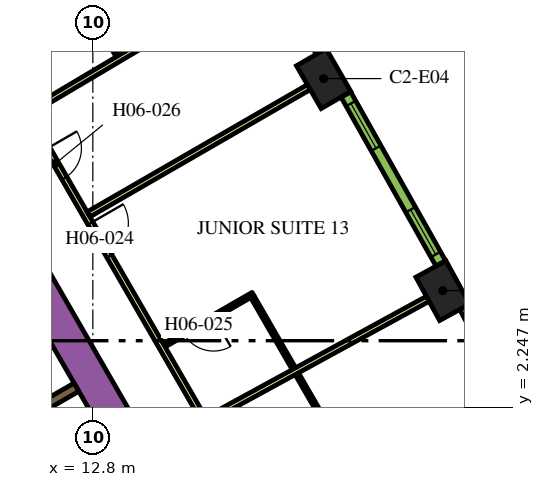
"""IFC4 building model, lengths in metres.
Left out: names, types, materials, properties, quantities, classifications, styles, units other than length and angle.
Written with IfcOpenShell. Run it as: python <this file> out.ifc"""

import sys

from ifc_helpers import new_model, si_unit, direction, frame, frame_2d, origin, origin_2d, place, context, subcontext, project, spatial, rectangle, extrude, element, fill, save


model = new_model("IFC4")
c1 = context("Model", 3, precision=1e-05, world=origin(), true_north=direction((0.0, 1.0)))
c2 = subcontext(c1, "Body", "Model", "MODEL_VIEW")
j1 = project(units=[si_unit("LENGTHUNIT", "METRE"), si_unit("PLANEANGLEUNIT", "RADIAN")], contexts=[c1])
p1 = place(None, origin())
s1 = spatial("IfcSite", under=j1, at=p1, CompositionType="ELEMENT")
p2 = place(p1, origin())
s2 = spatial("IfcBuilding", under=s1, at=p2, CompositionType="ELEMENT")
p3 = place(p2, frame((0.0, 0.0, 87.6)))
s3 = spatial("IfcBuildingStorey", under=s2, at=p3, CompositionType="ELEMENT", Elevation=87.6)
for number, where, z_axis, x_axis in (
    (1, (22.009, 5.317, 0.0), (0.0, 0.0, 1.0), (-0.48, 0.877, 0.0)),
    (2, (18.874, 10.897, 0.0), (0.0, 0.0, 1.0), (-0.5, 0.866, 0.0)),
):
    element("IfcColumn", number, at=place(p3, frame(where, z_axis=z_axis, x_axis=x_axis)), inside=s3, PredefinedType="COLUMN", context=c2, shape_type="SweptSolid", body=[
        extrude(rectangle(XDim=1.3, YDim=0.9, at=origin_2d()), origin(), (0.0, 0.0, 1.0), 3.9),
    ])
p4 = place(p3, frame((6.776, 13.364, 0.0), z_axis=(0.0, 0.0, 1.0), x_axis=(0.500004177138, -0.8660229921, 0.0)))
e3 = element("IfcWall", 3, at=p4, inside=s3, PredefinedType="SOLIDWALL", context=c2, shape_type="SweptSolid", body=[
    extrude(rectangle(XDim=20.204, YDim=0.9, at=frame_2d((10.102, 0.0))), origin(), (0.0, 0.0, 1.0), 3.9),
])
p5 = place(p3, frame((10.464, 1.677, 0.0), z_axis=(0.0, 0.0, 1.0), x_axis=(0.86605622881, 0.499946605688, 0.0)))
e4 = element("IfcWall", 4, at=p5, inside=s3, PredefinedType="SOLIDWALL", context=c2, shape_type="SweptSolid", body=[
    extrude(rectangle(XDim=2.2, YDim=0.25, at=frame_2d((1.1, 0.0))), origin(), (0.0, 0.0, 1.0), 3.9),
])
p6 = place(p3, frame((6.163, 18.475, 0.0), z_axis=(0.0, 0.0, 1.0), x_axis=(0.500001317485, -0.866024643133, 0.0)))
e5 = element("IfcWall", 5, at=p6, inside=s3, PredefinedType="PARTITIONING", context=c2, shape_type="SweptSolid", body=[
    extrude(rectangle(XDim=25.767, YDim=0.15, at=frame_2d((12.883, 0.0))), origin(), (0.0, 0.0, 1.0), 2.75),
])
p7 = place(p6, frame((24.241, 0.0, 0.0)))
e6 = element("IfcOpeningElement", 6, at=p7, cuts=e5, PredefinedType="OPENING", context=c2, shape_type="SweptSolid", body=[
    extrude(rectangle(XDim=1.0, YDim=2.1, at=frame_2d((0.5, 1.05))), frame((0.0, 0.085, 0.0), z_axis=(0.0, -1.0, 0.0), x_axis=(1.0, 0.0, 0.0)), (0.0, 0.0, 1.0), 0.17),
])
p8 = place(p6, frame((13.144, 0.0, 0.0)))
e7 = element("IfcOpeningElement", 7, at=p8, cuts=e5, PredefinedType="OPENING", context=c2, shape_type="SweptSolid", body=[
    extrude(rectangle(XDim=1.0, YDim=2.1, at=frame_2d((0.5, 1.05))), frame((0.0, 0.085, 0.0), z_axis=(0.0, -1.0, 0.0), x_axis=(1.0, 0.0, 0.0)), (0.0, 0.0, 1.0), 0.17),
])
p9 = place(p6, frame((10.874, 0.0, 0.0)))
e8 = element("IfcOpeningElement", 8, at=p9, cuts=e5, PredefinedType="OPENING", context=c2, shape_type="SweptSolid", body=[
    extrude(rectangle(XDim=0.9, YDim=2.1, at=frame_2d((0.45, 1.05))), frame((0.0, 0.085, 0.0), z_axis=(0.0, -1.0, 0.0), x_axis=(1.0, 0.0, 0.0)), (0.0, 0.0, 1.0), 0.17),
])
p10 = place(p6, frame((3.718, 0.0, 0.0)))
e9 = element("IfcOpeningElement", 9, at=p10, cuts=e5, PredefinedType="OPENING", context=c2, shape_type="SweptSolid", body=[
    extrude(rectangle(XDim=1.1, YDim=2.1, at=frame_2d((0.55, 1.05))), frame((0.0, 0.085, 0.0), z_axis=(0.0, -1.0, 0.0), x_axis=(1.0, 0.0, 0.0)), (0.0, 0.0, 1.0), 0.17),
])
p11 = place(p6, frame((2.411, 0.0, 0.0)))
e10 = element("IfcOpeningElement", 10, at=p11, cuts=e5, PredefinedType="OPENING", context=c2, shape_type="SweptSolid", body=[
    extrude(rectangle(XDim=1.0, YDim=2.1, at=frame_2d((0.5, 1.05))), frame((0.0, 0.085, 0.0), z_axis=(0.0, -1.0, 0.0), x_axis=(1.0, 0.0, 0.0)), (0.0, 0.0, 1.0), 0.17),
])
p12 = place(p3, frame((17.379, 13.731, 0.0), z_axis=(0.0, 0.0, 1.0), x_axis=(-0.860132461691, -0.510070728768, 0.0)))
e11 = element("IfcWall", 11, at=p12, inside=s3, PredefinedType="PARTITIONING", context=c2, shape_type="SweptSolid", body=[
    extrude(rectangle(XDim=7.257, YDim=0.15, at=frame_2d((3.628, 0.0))), origin(), (0.0, 0.0, 1.0), 2.75),
])
p13 = place(p3, frame((18.484, 10.672, 0.0), z_axis=(0.0, 0.0, 1.0), x_axis=(-0.866019162053, -0.50001081084, 0.0)))
e12 = element("IfcWall", 12, at=p13, inside=s3, PredefinedType="PARTITIONING", context=c2, shape_type="SweptSolid", body=[
    extrude(rectangle(XDim=6.694, YDim=0.15, at=frame_2d((3.347, 0.0))), origin(), (0.0, 0.0, 1.0), 2.75),
])
p14 = place(p3, frame((21.614, 5.102, 0.0), z_axis=(0.0, 0.0, 1.0), x_axis=(-0.877484555087, -0.479604895287, 0.0)))
e13 = element("IfcWall", 13, at=p14, inside=s3, PredefinedType="PARTITIONING", context=c2, shape_type="SweptSolid", body=[
    extrude(rectangle(XDim=6.611, YDim=0.15, at=frame_2d((3.306, 0.0))), origin(), (0.0, 0.0, 1.0), 2.75),
])
p15 = place(p3, frame((19.196, 1.351, 0.0), z_axis=(0.0, 0.0, 1.0), x_axis=(-0.499956128963, 0.866050731258, 0.0)))
e14 = element("IfcWall", 14, at=p15, inside=s3, PredefinedType="PARTITIONING", context=c2, shape_type="SweptSolid", body=[
    extrude(rectangle(XDim=2.05, YDim=0.1, at=frame_2d((1.025, 0.0))), origin(), (0.0, 0.0, 1.0), 2.75),
])
p16 = place(p3, frame((17.016, 5.228, 0.0), z_axis=(0.0, 0.0, 1.0), x_axis=(-0.86599734893, -0.500048589285, 0.0)))
e15 = element("IfcWall", 15, at=p16, inside=s3, PredefinedType="PARTITIONING", context=c2, shape_type="SweptSolid", body=[
    extrude(rectangle(XDim=2.7, YDim=0.1, at=frame_2d((1.35, 0.0))), origin(), (0.0, 0.0, 1.0), 2.75),
])
p17 = place(p16, frame((1.2, 0.0, 0.0)))
e16 = element("IfcOpeningElement", 16, at=p17, cuts=e15, PredefinedType="OPENING", context=c2, shape_type="SweptSolid", body=[
    extrude(rectangle(XDim=0.9, YDim=2.1, at=frame_2d((0.45, 1.05))), frame((0.0, 0.06, 0.0), z_axis=(0.0, -1.0, 0.0), x_axis=(1.0, 0.0, 0.0)), (0.0, 0.0, 1.0), 0.12),
])
p18 = place(p3, frame((16.997, 5.16, 0.0), z_axis=(0.0, 0.0, 1.0), x_axis=(0.500011965869, -0.866018495177, 0.0)))
e17 = element("IfcWall", 17, at=p18, inside=s3, PredefinedType="PARTITIONING", context=c2, shape_type="SweptSolid", body=[
    extrude(rectangle(XDim=2.19, YDim=0.1, at=frame_2d((1.095, 0.0))), origin(), (0.0, 0.0, 1.0), 2.75),
])
p19 = place(p3, frame((12.259, 13.567, 0.0), z_axis=(0.0, 0.0, 1.0), x_axis=(0.500017192868, -0.86601547725, 0.0)))
e18 = element("IfcWall", 18, at=p19, inside=s3, PredefinedType="PARTITIONING", context=c2, shape_type="SweptSolid", body=[
    extrude(rectangle(XDim=2.39, YDim=0.1, at=frame_2d((1.195, 0.0))), origin(), (0.0, 0.0, 1.0), 2.75),
])
p20 = place(p3, frame((24.977, 0.383, 0.0), z_axis=(0.0, 0.0, 1.0), x_axis=(-0.469323203119, 0.883026461106, 0.0)))
e19 = element("IfcWall", 19, at=p20, inside=s3, PredefinedType="SOLIDWALL", context=c2, shape_type="SweptSolid", body=[
    extrude(rectangle(XDim=5.101, YDim=0.29, at=frame_2d((2.55, 0.0))), origin(), (0.0, 0.0, 1.0), 3.65),
])
p21 = place(p20, frame((0.273, 0.0, 0.9)))
e20 = element("IfcOpeningElement", 20, at=p21, cuts=e19, PredefinedType="OPENING", context=c2, shape_type="SweptSolid", body=[
    extrude(rectangle(XDim=1.35, YDim=2.15, at=frame_2d((0.675, 1.075))), frame((0.0, 0.155, 0.0), z_axis=(0.0, -1.0, 0.0), x_axis=(1.0, 0.0, 0.0)), (0.0, 0.0, 1.0), 0.31),
])
p22 = place(p20, frame((3.478, 0.0, 0.9)))
e21 = element("IfcOpeningElement", 21, at=p22, cuts=e19, PredefinedType="OPENING", context=c2, shape_type="SweptSolid", body=[
    extrude(rectangle(XDim=1.35, YDim=2.15, at=frame_2d((0.675, 1.075))), frame((0.0, 0.155, 0.0), z_axis=(0.0, -1.0, 0.0), x_axis=(1.0, 0.0, 0.0)), (0.0, 0.0, 1.0), 0.31),
])
p23 = place(p3, frame((21.956, 6.033, 0.0), z_axis=(0.0, 0.0, 1.0), x_axis=(-0.48983164787, 0.87181704316, 0.0)))
e22 = element("IfcWall", 22, at=p23, inside=s3, PredefinedType="SOLIDWALL", context=c2, shape_type="SweptSolid", body=[
    extrude(rectangle(XDim=5.1, YDim=0.29, at=frame_2d((2.55, 0.0))), origin(), (0.0, 0.0, 1.0), 3.65),
])
p24 = place(p23, frame((0.273, 0.0, 0.9)))
e23 = element("IfcOpeningElement", 23, at=p24, cuts=e22, PredefinedType="OPENING", context=c2, shape_type="SweptSolid", body=[
    extrude(rectangle(XDim=1.35, YDim=2.15, at=frame_2d((0.675, 1.075))), frame((0.0, 0.155, 0.0), z_axis=(0.0, -1.0, 0.0), x_axis=(1.0, 0.0, 0.0)), (0.0, 0.0, 1.0), 0.31),
])
p25 = place(p23, frame((3.478, 0.0, 0.9)))
e24 = element("IfcOpeningElement", 24, at=p25, cuts=e22, PredefinedType="OPENING", context=c2, shape_type="SweptSolid", body=[
    extrude(rectangle(XDim=1.35, YDim=2.15, at=frame_2d((0.675, 1.075))), frame((0.0, 0.155, 0.0), z_axis=(0.0, -1.0, 0.0), x_axis=(1.0, 0.0, 0.0)), (0.0, 0.0, 1.0), 0.31),
])
p26 = place(p3, frame((18.805, 11.611, 0.0), z_axis=(0.0, 0.0, 1.0), x_axis=(-0.510054281659, 0.860142214847, 0.0)))
e25 = element("IfcWall", 25, at=p26, inside=s3, PredefinedType="SOLIDWALL", context=c2, shape_type="SweptSolid", body=[
    extrude(rectangle(XDim=5.101, YDim=0.29, at=frame_2d((2.55, 0.0))), origin(), (0.0, 0.0, 1.0), 3.65),
])
p27 = place(p26, frame((0.273, 0.0, 0.9)))
e26 = element("IfcOpeningElement", 26, at=p27, cuts=e25, PredefinedType="OPENING", context=c2, shape_type="SweptSolid", body=[
    extrude(rectangle(XDim=1.35, YDim=2.15, at=frame_2d((0.675, 1.075))), frame((0.0, 0.155, 0.0), z_axis=(0.0, -1.0, 0.0), x_axis=(1.0, 0.0, 0.0)), (0.0, 0.0, 1.0), 0.31),
])
p28 = place(p26, frame((3.478, 0.0, 0.9)))
e27 = element("IfcOpeningElement", 27, at=p28, cuts=e25, PredefinedType="OPENING", context=c2, shape_type="SweptSolid", body=[
    extrude(rectangle(XDim=1.35, YDim=2.15, at=frame_2d((0.675, 1.075))), frame((0.0, 0.155, 0.0), z_axis=(0.0, -1.0, 0.0), x_axis=(1.0, 0.0, 0.0)), (0.0, 0.0, 1.0), 0.31),
])
p29 = place(p8, origin())
e28 = element("IfcDoor", 28, at=p29, inside=s3, OperationType="SINGLE_SWING_LEFT", PredefinedType="DOOR", context=c2, shape_type="SweptSolid", body=[
    extrude(rectangle(XDim=1.0, YDim=2.1, at=frame_2d((0.5, 1.05))), frame((0.0, 0.025, 0.0), z_axis=(0.0, -1.0, 0.0), x_axis=(1.0, 0.0, 0.0)), (0.0, 0.0, 1.0), 0.05),
])
fill(e7, e28)
p30 = place(p17, origin())
e29 = element("IfcDoor", 29, at=p30, inside=s3, OperationType="SINGLE_SWING_LEFT", PredefinedType="DOOR", context=c2, shape_type="SweptSolid", body=[
    extrude(rectangle(XDim=0.9, YDim=2.1, at=frame_2d((0.45, 1.05))), frame((0.0, 0.025, 0.0), z_axis=(0.0, -1.0, 0.0), x_axis=(1.0, 0.0, 0.0)), (0.0, 0.0, 1.0), 0.05),
])
fill(e16, e29)
p31 = place(p9, origin())
e30 = element("IfcDoor", 30, at=p31, inside=s3, OperationType="SINGLE_SWING_RIGHT", PredefinedType="DOOR", context=c2, shape_type="SweptSolid", body=[
    extrude(rectangle(XDim=0.9, YDim=2.1, at=frame_2d((0.45, 1.05))), frame((0.0, 0.025, 0.0), z_axis=(0.0, -1.0, 0.0), x_axis=(1.0, 0.0, 0.0)), (0.0, 0.0, 1.0), 0.05),
])
fill(e8, e30)
p32 = place(p24, origin())
e31 = element("IfcWindow", 31, at=p32, inside=s3, PartitioningType="DOUBLE_PANEL_VERTICAL", PredefinedType="WINDOW", context=c2, shape_type="SweptSolid", body=[
    extrude(rectangle(XDim=1.35, YDim=2.15, at=frame_2d((0.675, 1.075))), frame((0.0, 0.015, 0.0), z_axis=(0.0, -1.0, 0.0), x_axis=(1.0, 0.0, 0.0)), (0.0, 0.0, 1.0), 0.06),
])
fill(e23, e31)
p33 = place(p25, origin())
e32 = element("IfcWindow", 32, at=p33, inside=s3, PartitioningType="DOUBLE_PANEL_VERTICAL", PredefinedType="WINDOW", context=c2, shape_type="SweptSolid", body=[
    extrude(rectangle(XDim=1.35, YDim=2.15, at=frame_2d((0.675, 1.075))), frame((0.0, 0.015, 0.0), z_axis=(0.0, -1.0, 0.0), x_axis=(1.0, 0.0, 0.0)), (0.0, 0.0, 1.0), 0.06),
])
fill(e24, e32)
save(model, sys.argv[1])
